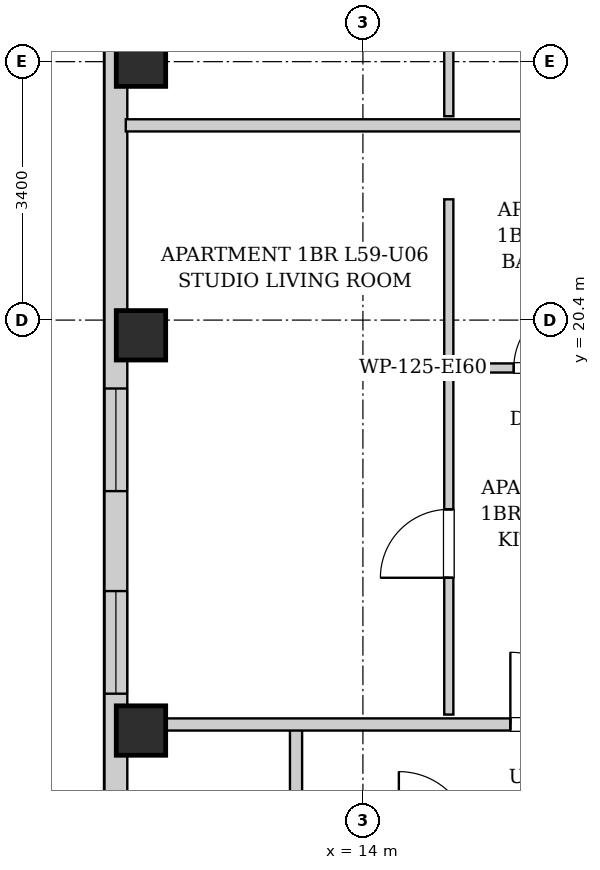
"""IFC4 building model, lengths in metres.
Left out: names, types, materials, properties, quantities, classifications, styles, units other than length and angle.
Written with IfcOpenShell. Run it as: python <this file> out.ifc"""

import sys

from ifc_helpers import new_model, si_unit, direction, frame, frame_2d, origin, origin_2d, place, context, subcontext, project, spatial, rectangle, extrude, element, fill, save


model = new_model("IFC4")
c1 = context("Model", 3, precision=1e-05, world=origin(), true_north=direction((0.0, 1.0)))
c2 = subcontext(c1, "Body", "Model", "MODEL_VIEW")
j1 = project(units=[si_unit("LENGTHUNIT", "METRE"), si_unit("PLANEANGLEUNIT", "RADIAN")], contexts=[c1])
p1 = place(None, origin())
s1 = spatial("IfcSite", under=j1, at=p1, CompositionType="ELEMENT")
p2 = place(p1, origin())
s2 = spatial("IfcBuilding", under=s1, at=p2, CompositionType="ELEMENT")
p3 = place(p2, frame((0.0, 0.0, 204.1)))
s3 = spatial("IfcBuildingStorey", under=s2, at=p3, CompositionType="ELEMENT", Elevation=204.1)
for number, where, z_axis, x_axis in (
    (1, (11.08, 15.0, 0.0), (0.0, 0.0, 1.0), (1.0, 0.0, 0.0)),
    (2, (11.08, 20.2, 0.0), (0.0, 0.0, 1.0), (1.0, 0.0, 0.0)),
    (3, (11.08, 23.8, 0.0), (0.0, 0.0, 1.0), (1.0, 0.0, 0.0)),
):
    element("IfcColumn", number, at=place(p3, frame(where, z_axis=z_axis, x_axis=x_axis)), inside=s3, PredefinedType="COLUMN", context=c2, shape_type="SweptSolid", body=[
        extrude(rectangle(XDim=0.65, YDim=0.65, at=origin_2d()), origin(), (0.0, 0.0, 1.0), 3.3),
    ])
p4 = place(p3, frame((10.75, 6.3, 0.0), z_axis=(0.0, 0.0, 1.0), x_axis=(0.0, 1.0, 0.0)))
e4 = element("IfcWall", 4, at=p4, inside=s3, PredefinedType="SOLIDWALL", context=c2, shape_type="SweptSolid", body=[
    extrude(rectangle(XDim=31.4, YDim=0.3, at=frame_2d((15.7, 0.0))), origin(), (0.0, 0.0, 1.0), 3.04),
])
p5 = place(p4, frame((1.504, 0.0, 0.55)))
e5 = element("IfcOpeningElement", 5, at=p5, cuts=e4, PredefinedType="OPENING", context=c2, shape_type="SweptSolid", body=[
    extrude(rectangle(XDim=1.35, YDim=1.2, at=frame_2d((0.675, 0.6))), frame((0.0, 0.16, 0.0), z_axis=(0.0, -1.0, 0.0), x_axis=(1.0, 0.0, 0.0)), (0.0, 0.0, 1.0), 0.32),
])
p6 = place(p4, frame((28.546, 0.0, 0.55)))
e6 = element("IfcOpeningElement", 6, at=p6, cuts=e4, PredefinedType="OPENING", context=c2, shape_type="SweptSolid", body=[
    extrude(rectangle(XDim=1.35, YDim=1.2, at=frame_2d((0.675, 0.6))), frame((0.0, 0.16, 0.0), z_axis=(0.0, -1.0, 0.0), x_axis=(1.0, 0.0, 0.0)), (0.0, 0.0, 1.0), 0.32),
])
p7 = place(p4, frame((11.85, 0.0, 0.55)))
e7 = element("IfcOpeningElement", 7, at=p7, cuts=e4, PredefinedType="OPENING", context=c2, shape_type="SweptSolid", body=[
    extrude(rectangle(XDim=1.35, YDim=1.2, at=frame_2d((0.675, 0.6))), frame((0.0, 0.16, 0.0), z_axis=(0.0, -1.0, 0.0), x_axis=(1.0, 0.0, 0.0)), (0.0, 0.0, 1.0), 0.32),
])
p8 = place(p4, frame((9.185, 0.0, 0.55)))
e8 = element("IfcOpeningElement", 8, at=p8, cuts=e4, PredefinedType="OPENING", context=c2, shape_type="SweptSolid", body=[
    extrude(rectangle(XDim=1.35, YDim=1.2, at=frame_2d((0.675, 0.6))), frame((0.0, 0.16, 0.0), z_axis=(0.0, -1.0, 0.0), x_axis=(1.0, 0.0, 0.0)), (0.0, 0.0, 1.0), 0.32),
])
p9 = place(p4, frame((19.006, 0.0, 0.55)))
e9 = element("IfcOpeningElement", 9, at=p9, cuts=e4, PredefinedType="OPENING", context=c2, shape_type="SweptSolid", body=[
    extrude(rectangle(XDim=1.35, YDim=1.2, at=frame_2d((0.675, 0.6))), frame((0.0, 0.16, 0.0), z_axis=(0.0, -1.0, 0.0), x_axis=(1.0, 0.0, 0.0)), (0.0, 0.0, 1.0), 0.32),
])
p10 = place(p4, frame((20.616, 0.0, 0.55)))
e10 = element("IfcOpeningElement", 10, at=p10, cuts=e4, PredefinedType="OPENING", context=c2, shape_type="SweptSolid", body=[
    extrude(rectangle(XDim=1.35, YDim=1.2, at=frame_2d((0.675, 0.6))), frame((0.0, 0.16, 0.0), z_axis=(0.0, -1.0, 0.0), x_axis=(1.0, 0.0, 0.0)), (0.0, 0.0, 1.0), 0.32),
])
p11 = place(p3, frame((13.12, 13.51, 0.0), z_axis=(0.0, 0.0, 1.0), x_axis=(0.0, 1.0, 0.0)))
e11 = element("IfcWall", 11, at=p11, inside=s3, PredefinedType="PARTITIONING", context=c2, shape_type="SweptSolid", body=[
    extrude(rectangle(XDim=1.58, YDim=0.16, at=frame_2d((0.79, 0.0))), origin(), (0.0, 0.0, 1.0), 3.04),
])
p12 = place(p3, frame((10.88, 15.08, 0.0), z_axis=(0.0, 0.0, 1.0), x_axis=(1.0, 0.0, 0.0)))
e12 = element("IfcWall", 12, at=p12, inside=s3, PredefinedType="PARTITIONING", context=c2, shape_type="SweptSolid", body=[
    extrude(rectangle(XDim=6.88, YDim=0.16, at=frame_2d((3.44, 0.0))), origin(), (0.0, 0.0, 1.0), 2.556),
])
p13 = place(p12, frame((5.06, 0.0, 0.0)))
e13 = element("IfcOpeningElement", 13, at=p13, cuts=e12, PredefinedType="OPENING", context=c2, shape_type="SweptSolid", body=[
    extrude(rectangle(XDim=0.95, YDim=2.1, at=frame_2d((0.475, 1.05))), frame((0.0, 0.09, 0.0), z_axis=(0.0, -1.0, 0.0), x_axis=(1.0, 0.0, 0.0)), (0.0, 0.0, 1.0), 0.18),
])
p14 = place(p3, frame((10.88, 22.962, 0.0), z_axis=(0.0, 0.0, 1.0), x_axis=(1.0, 0.0, 0.0)))
e14 = element("IfcWall", 14, at=p14, inside=s3, PredefinedType="PARTITIONING", context=c2, shape_type="SweptSolid", body=[
    extrude(rectangle(XDim=6.76, YDim=0.16, at=frame_2d((3.38, 0.0))), origin(), (0.0, 0.0, 1.0), 3.04),
])
p15 = place(p3, frame((15.19, 19.77, 0.0), z_axis=(0.0, 0.0, 1.0), x_axis=(1.0, 0.0, 0.0)))
e15 = element("IfcWall", 15, at=p15, inside=s3, PredefinedType="PARTITIONING", context=c2, shape_type="SweptSolid", body=[
    extrude(rectangle(XDim=2.45, YDim=0.12, at=frame_2d((1.225, 0.0))), origin(), (0.0, 0.0, 1.0), 3.04),
])
p16 = place(p15, frame((0.795, 0.0, 0.0)))
e16 = element("IfcOpeningElement", 16, at=p16, cuts=e15, PredefinedType="OPENING", context=c2, shape_type="SweptSolid", body=[
    extrude(rectangle(XDim=0.86, YDim=2.05, at=frame_2d((0.43, 1.025))), frame((0.0, 0.07, 0.0), z_axis=(0.0, -1.0, 0.0), x_axis=(1.0, 0.0, 0.0)), (0.0, 0.0, 1.0), 0.14),
])
p17 = place(p3, frame((15.13, 19.83, 0.0), z_axis=(0.0, 0.0, 1.0), x_axis=(0.0, 1.0, 0.0)))
e17 = element("IfcWall", 17, at=p17, inside=s3, PredefinedType="PARTITIONING", context=c2, shape_type="SweptSolid", body=[
    extrude(rectangle(XDim=2.159, YDim=0.12, at=frame_2d((1.08, 0.0))), origin(), (0.0, 0.0, 1.0), 3.04),
])
p18 = place(p3, frame((15.13, 15.21, 0.0), z_axis=(0.0, 0.0, 1.0), x_axis=(0.0, 1.0, 0.0)))
e18 = element("IfcWall", 18, at=p18, inside=s3, PredefinedType="PARTITIONING", context=c2, shape_type="SweptSolid", body=[
    extrude(rectangle(XDim=4.5, YDim=0.12, at=frame_2d((2.25, 0.0))), origin(), (0.0, 0.0, 1.0), 3.04),
])
p19 = place(p18, frame((1.8, 0.0, 0.0)))
e19 = element("IfcOpeningElement", 19, at=p19, cuts=e18, PredefinedType="OPENING", context=c2, shape_type="SweptSolid", body=[
    extrude(rectangle(XDim=0.9, YDim=2.05, at=frame_2d((0.45, 1.025))), frame((0.0, 0.07, 0.0), z_axis=(0.0, -1.0, 0.0), x_axis=(1.0, 0.0, 0.0)), (0.0, 0.0, 1.0), 0.14),
])
p20 = place(p3, frame((15.13, 23.082, 0.0), z_axis=(0.0, 0.0, 1.0), x_axis=(0.0, 1.0, 0.0)))
e20 = element("IfcWall", 20, at=p20, inside=s3, PredefinedType="PARTITIONING", context=c2, shape_type="SweptSolid", body=[
    extrude(rectangle(XDim=1.85, YDim=0.12, at=frame_2d((0.925, 0.0))), origin(), (0.0, 0.0, 1.0), 3.04),
])
p21 = place(p13, origin())
e21 = element("IfcDoor", 21, at=p21, inside=s3, OperationType="SINGLE_SWING_LEFT", PredefinedType="DOOR", context=c2, shape_type="SweptSolid", body=[
    extrude(rectangle(XDim=0.95, YDim=2.1, at=frame_2d((0.475, 1.05))), frame((0.0, 0.025, 0.0), z_axis=(0.0, -1.0, 0.0), x_axis=(1.0, 0.0, 0.0)), (0.0, 0.0, 1.0), 0.05),
])
fill(e13, e21)
p22 = place(p16, origin())
e22 = element("IfcDoor", 22, at=p22, inside=s3, OperationType="SINGLE_SWING_RIGHT", PredefinedType="DOOR", context=c2, shape_type="SweptSolid", body=[
    extrude(rectangle(XDim=0.86, YDim=2.05, at=frame_2d((0.43, 1.025))), frame((0.0, 0.025, 0.0), z_axis=(0.0, -1.0, 0.0), x_axis=(1.0, 0.0, 0.0)), (0.0, 0.0, 1.0), 0.05),
])
fill(e16, e22)
p23 = place(p19, origin())
e23 = element("IfcDoor", 23, at=p23, inside=s3, OperationType="SINGLE_SWING_LEFT", PredefinedType="DOOR", context=c2, shape_type="SweptSolid", body=[
    extrude(rectangle(XDim=0.9, YDim=2.05, at=frame_2d((0.45, 1.025))), frame((0.0, 0.025, 0.0), z_axis=(0.0, -1.0, 0.0), x_axis=(1.0, 0.0, 0.0)), (0.0, 0.0, 1.0), 0.05),
])
fill(e19, e23)
p24 = place(p7, origin())
e24 = element("IfcWindow", 24, at=p24, inside=s3, PartitioningType="SINGLE_PANEL", PredefinedType="WINDOW", context=c2, shape_type="SweptSolid", body=[
    extrude(rectangle(XDim=1.35, YDim=1.2, at=frame_2d((0.675, 0.6))), frame((0.0, 0.03, 0.0), z_axis=(0.0, -1.0, 0.0), x_axis=(1.0, 0.0, 0.0)), (0.0, 0.0, 1.0), 0.06),
])
fill(e7, e24)
p25 = place(p8, origin())
e25 = element("IfcWindow", 25, at=p25, inside=s3, PartitioningType="SINGLE_PANEL", PredefinedType="WINDOW", context=c2, shape_type="SweptSolid", body=[
    extrude(rectangle(XDim=1.35, YDim=1.2, at=frame_2d((0.675, 0.6))), frame((0.0, 0.03, 0.0), z_axis=(0.0, -1.0, 0.0), x_axis=(1.0, 0.0, 0.0)), (0.0, 0.0, 1.0), 0.06),
])
fill(e8, e25)
save(model, sys.argv[1])
